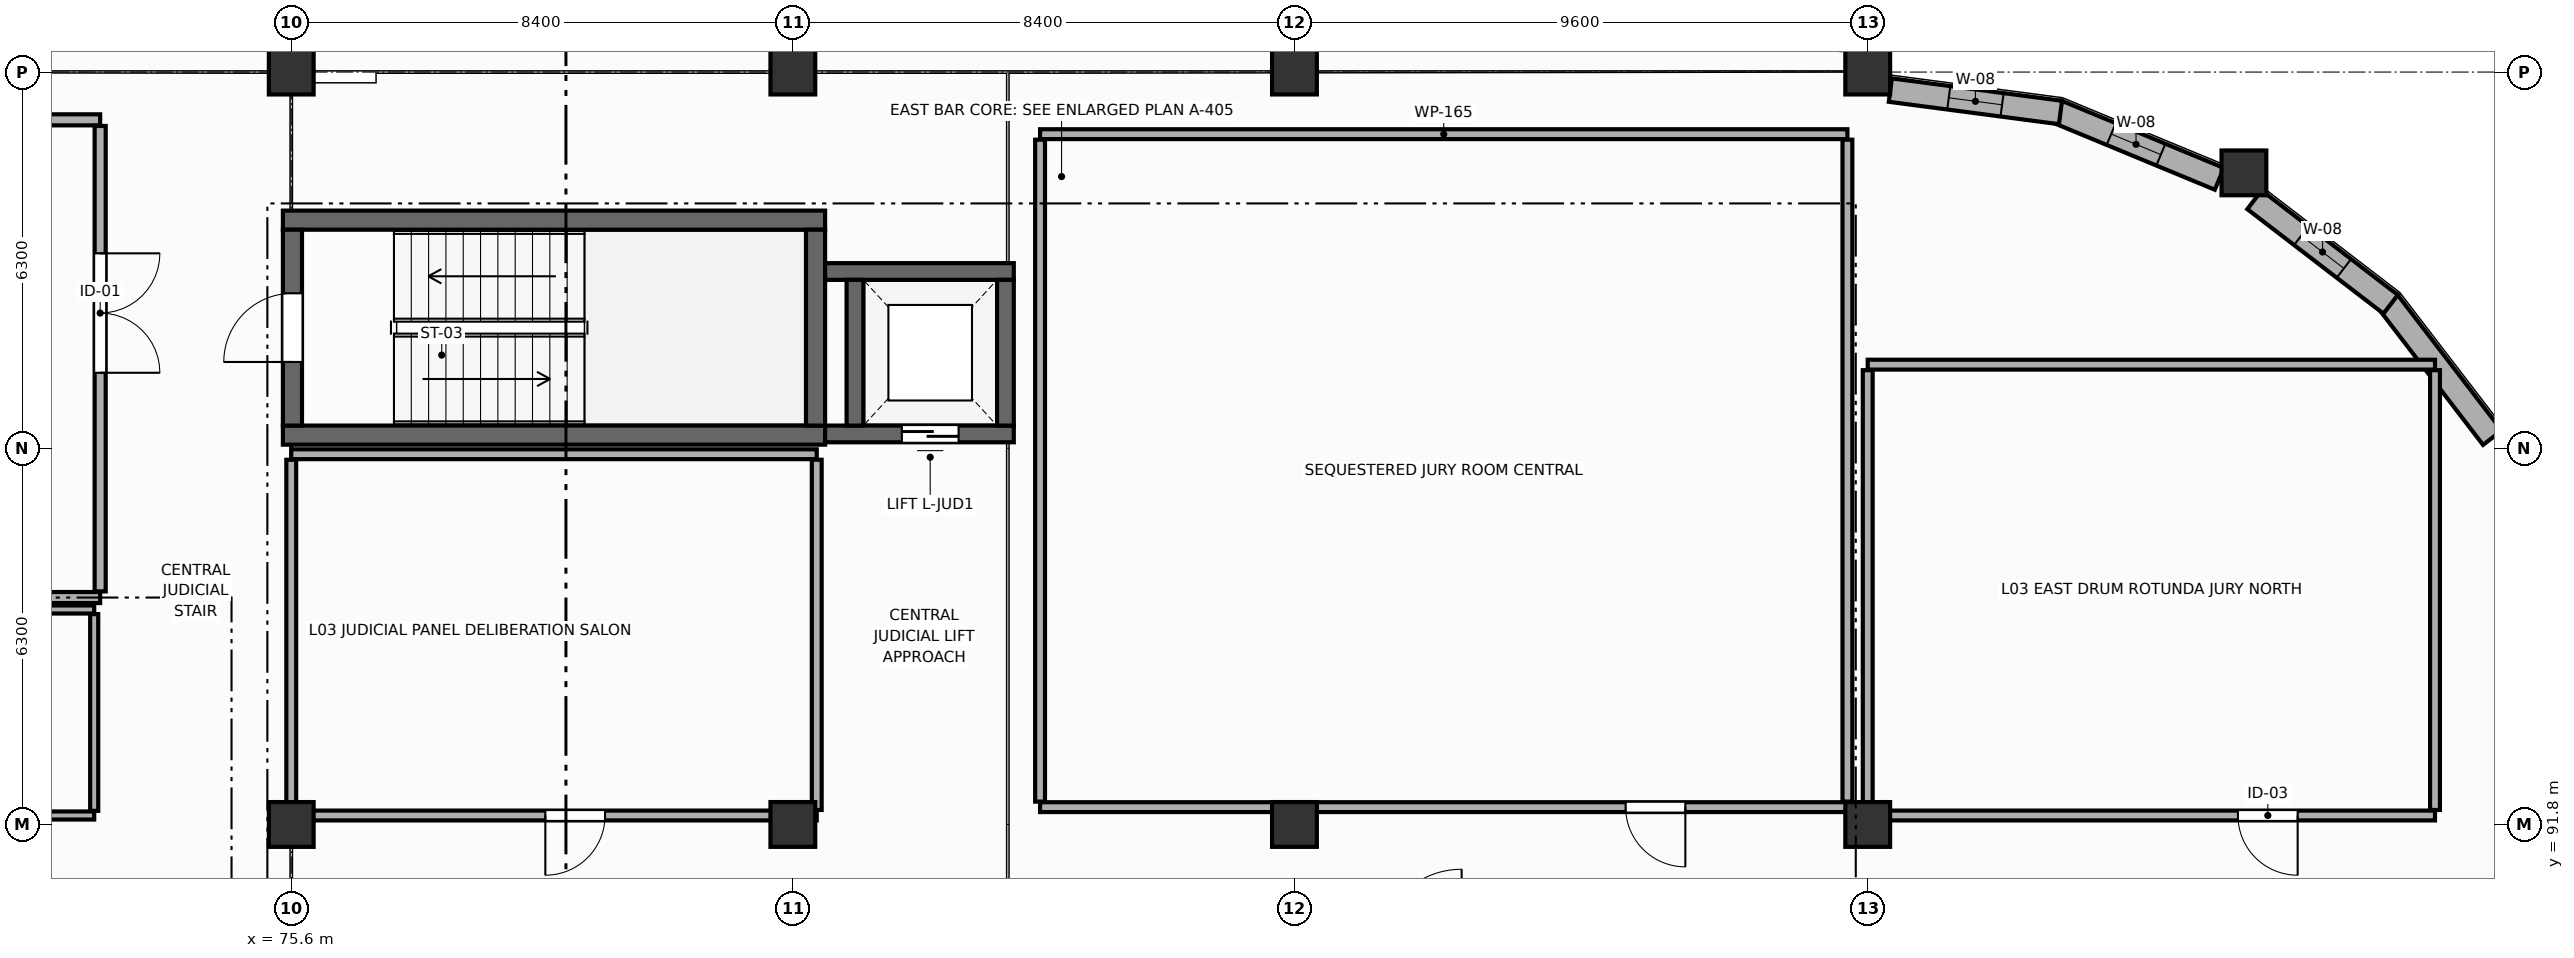
"""IFC4 building model, lengths in metres.
Left out: names, types, materials, properties, quantities, classifications, styles, units other than length and angle.
Written with IfcOpenShell. Run it as: python <this file> out.ifc"""

import sys

from ifc_helpers import new_model, si_unit, direction, frame, frame_2d, origin, origin_2d, place, context, subcontext, project, spatial, rectangle, circle, extrude, element, fill, save


model = new_model("IFC4")
c1 = context("Model", 3, precision=1e-05, world=origin(), true_north=direction((0.0, 1.0)))
c2 = subcontext(c1, "Body", "Model", "MODEL_VIEW")
j1 = project(units=[si_unit("LENGTHUNIT", "METRE"), si_unit("PLANEANGLEUNIT", "RADIAN")], contexts=[c1])
p1 = place(None, origin())
s1 = spatial("IfcSite", under=j1, at=p1, CompositionType="ELEMENT")
p2 = place(p1, origin())
s2 = spatial("IfcBuilding", under=s1, at=p2, CompositionType="ELEMENT")
p3 = place(p2, frame((0.0, 0.0, 9.9)))
s3 = spatial("IfcBuildingStorey", under=s2, at=p3, CompositionType="ELEMENT", Elevation=9.9)
for number, where, z_axis, x_axis in (
    (1, (75.6, 91.8, 0.0), (0.0, 0.0, 1.0), (1.0, 0.0, 0.0)),
    (2, (75.6, 104.4, 0.0), (0.0, 0.0, 1.0), (1.0, 0.0, 0.0)),
    (3, (84.0, 91.8, 0.0), (0.0, 0.0, 1.0), (1.0, 0.0, 0.0)),
    (4, (84.0, 104.4, 0.0), (0.0, 0.0, 1.0), (1.0, 0.0, 0.0)),
    (5, (92.4, 91.8, 0.0), (0.0, 0.0, 1.0), (1.0, 0.0, 0.0)),
    (6, (92.4, 104.4, 0.0), (0.0, 0.0, 1.0), (1.0, 0.0, 0.0)),
    (7, (102.0, 91.8, 0.0), (0.0, 0.0, 1.0), (1.0, 0.0, 0.0)),
    (8, (102.0, 104.4, 0.0), (0.0, 0.0, 1.0), (1.0, 0.0, 0.0)),
):
    element("IfcColumn", number, at=place(p3, frame(where, z_axis=z_axis, x_axis=x_axis)), inside=s3, PredefinedType="COLUMN", context=c2, shape_type="SweptSolid", body=[
        extrude(rectangle(XDim=0.75, YDim=0.75, at=origin_2d()), origin(), (0.0, 0.0, 1.0), 4.5),
    ])
p4 = place(p3, frame((108.3, 102.712, 0.0), z_axis=(0.0, 0.0, 1.0), x_axis=(1.0, 0.0, 0.0)))
e9 = element("IfcColumn", 9, at=p4, inside=s3, PredefinedType="COLUMN", context=c2, shape_type="SweptSolid", body=[
    extrude(circle(Radius=0.375, at=origin_2d()), origin(), (0.0, 0.0, 1.0), 4.5),
])
p5 = place(p3, frame((112.461, 98.277, 0.0), z_axis=(0.0, 0.0, 1.0), x_axis=(-0.608770300127, 0.793346533164, 0.0)))
e10 = element("IfcWall", 10, at=p5, inside=s3, PredefinedType="ELEMENTEDWALL", context=c2, shape_type="SweptSolid", body=[
    extrude(rectangle(XDim=2.874, YDim=0.395, at=frame_2d((1.437, 0.0))), origin(), (0.0, 0.0, 1.0), 3.38),
])
p6 = place(p3, frame((110.757, 100.511, 0.0), z_axis=(0.0, 0.0, 1.0), x_axis=(-0.793346533164, 0.608770300127, 0.0)))
e11 = element("IfcWall", 11, at=p6, inside=s3, PredefinedType="ELEMENTEDWALL", context=c2, shape_type="SweptSolid", body=[
    extrude(rectangle(XDim=2.874, YDim=0.395, at=frame_2d((1.437, 0.0))), origin(), (0.0, 0.0, 1.0), 3.28),
])
p7 = place(p6, frame((0.987, 0.0, 0.85)))
e12 = element("IfcOpeningElement", 12, at=p7, cuts=e11, PredefinedType="OPENING", context=c2, shape_type="SweptSolid", body=[
    extrude(rectangle(XDim=0.9, YDim=1.85, at=frame_2d((0.45, 0.925))), frame((0.0, 0.208, 0.0), z_axis=(0.0, -1.0, 0.0), x_axis=(1.0, 0.0, 0.0)), (0.0, 0.0, 1.0), 0.415),
])
p8 = place(p3, frame((107.888, 102.612, 0.0), z_axis=(0.0, 0.0, 1.0), x_axis=(-0.923871445027, 0.382702956696, 0.0)))
e13 = element("IfcWall", 13, at=p8, inside=s3, PredefinedType="ELEMENTEDWALL", context=c2, shape_type="SweptSolid", body=[
    extrude(rectangle(XDim=2.947, YDim=0.395, at=frame_2d((1.474, 0.0))), origin(), (0.0, 0.0, 1.0), 3.28),
])
p9 = place(p8, frame((1.06, 0.0, 0.85)))
e14 = element("IfcOpeningElement", 14, at=p9, cuts=e13, PredefinedType="OPENING", context=c2, shape_type="SweptSolid", body=[
    extrude(rectangle(XDim=0.9, YDim=1.85, at=frame_2d((0.45, 0.925))), frame((0.0, 0.208, 0.0), z_axis=(0.0, -1.0, 0.0), x_axis=(1.0, 0.0, 0.0)), (0.0, 0.0, 1.0), 0.415),
])
p10 = place(p3, frame((105.229, 103.723, 0.0), z_axis=(0.0, 0.0, 1.0), x_axis=(-0.991451982445, 0.130472090904, 0.0)))
e15 = element("IfcWall", 15, at=p10, inside=s3, PredefinedType="ELEMENTEDWALL", context=c2, shape_type="SweptSolid", body=[
    extrude(rectangle(XDim=2.874, YDim=0.395, at=frame_2d((1.437, 0.0))), origin(), (0.0, 0.0, 1.0), 3.38),
])
p11 = place(p10, frame((0.987, 0.0, 0.85)))
e16 = element("IfcOpeningElement", 16, at=p11, cuts=e15, PredefinedType="OPENING", context=c2, shape_type="SweptSolid", body=[
    extrude(rectangle(XDim=0.9, YDim=1.85, at=frame_2d((0.45, 0.925))), frame((0.0, 0.208, 0.0), z_axis=(0.0, -1.0, 0.0), x_axis=(1.0, 0.0, 0.0)), (0.0, 0.0, 1.0), 0.415),
])
for number, where, z_axis, x_axis in (
    (17, (75.46, 101.92, 0.0), (0.0, 0.0, 1.0), (1.0, 0.0, 0.0)),
    (18, (84.54, 98.32, 0.0), (0.0, 0.0, 1.0), (-1.0, 0.0, 0.0)),
):
    element("IfcWall", number, at=place(p3, frame(where, z_axis=z_axis, x_axis=x_axis)), inside=s3, PredefinedType="SHEAR", context=c2, shape_type="SweptSolid", body=[
        extrude(rectangle(XDim=9.08, YDim=0.32, at=frame_2d((4.54, 0.0))), origin(), (0.0, 0.0, 1.0), 4.25),
    ])
p12 = place(p3, frame((75.62, 98.48, 0.0), z_axis=(0.0, 0.0, 1.0), x_axis=(0.0, 1.0, 0.0)))
e19 = element("IfcWall", 19, at=p12, inside=s3, PredefinedType="SHEAR", context=c2, shape_type="SweptSolid", body=[
    extrude(rectangle(XDim=3.28, YDim=0.32, at=frame_2d((1.64, 0.0))), origin(), (0.0, 0.0, 1.0), 4.25),
])
p13 = place(p12, frame((1.065, 0.0, 0.0)))
e20 = element("IfcOpeningElement", 20, at=p13, cuts=e19, PredefinedType="OPENING", context=c2, shape_type="SweptSolid", body=[
    extrude(rectangle(XDim=1.15, YDim=2.2, at=frame_2d((0.575, 1.1))), frame((0.0, 0.17, 0.0), z_axis=(0.0, -1.0, 0.0), x_axis=(1.0, 0.0, 0.0)), (0.0, 0.0, 1.0), 0.34),
])
p14 = place(p3, frame((84.38, 101.76, 0.0), z_axis=(0.0, 0.0, 1.0), x_axis=(0.0, -1.0, 0.0)))
e21 = element("IfcWall", 21, at=p14, inside=s3, PredefinedType="SHEAR", context=c2, shape_type="SweptSolid", body=[
    extrude(rectangle(XDim=3.28, YDim=0.32, at=frame_2d((1.64, 0.0))), origin(), (0.0, 0.0, 1.0), 4.25),
])
p15 = place(p3, frame((84.54, 101.06, 0.0), z_axis=(0.0, 0.0, 1.0), x_axis=(1.0, 0.0, 0.0)))
e22 = element("IfcWall", 22, at=p15, inside=s3, PredefinedType="SHEAR", context=c2, shape_type="SweptSolid", body=[
    extrude(rectangle(XDim=3.16, YDim=0.28, at=frame_2d((1.58, 0.0))), origin(), (0.0, 0.0, 1.0), 4.25),
])
p16 = place(p3, frame((87.7, 98.34, 0.0), z_axis=(0.0, 0.0, 1.0), x_axis=(-1.0, 0.0, 0.0)))
e23 = element("IfcWall", 23, at=p16, inside=s3, PredefinedType="SHEAR", context=c2, shape_type="SweptSolid", body=[
    extrude(rectangle(XDim=3.16, YDim=0.28, at=frame_2d((1.58, 0.0))), origin(), (0.0, 0.0, 1.0), 4.25),
])
p17 = place(p16, frame((0.925, 0.0, 0.0)))
e24 = element("IfcOpeningElement", 24, at=p17, cuts=e23, PredefinedType="OPENING", context=c2, shape_type="SweptSolid", body=[
    extrude(rectangle(XDim=0.95, YDim=2.15, at=frame_2d((0.475, 1.075))), frame((0.0, 0.15, 0.0), z_axis=(0.0, -1.0, 0.0), x_axis=(1.0, 0.0, 0.0)), (0.0, 0.0, 1.0), 0.3),
])
for number, where, z_axis, x_axis in (
    (25, (85.04, 98.48, 0.0), (0.0, 0.0, 1.0), (0.0, 1.0, 0.0)),
    (26, (87.56, 100.92, 0.0), (0.0, 0.0, 1.0), (0.0, -1.0, 0.0)),
):
    element("IfcWall", number, at=place(p3, frame(where, z_axis=z_axis, x_axis=x_axis)), inside=s3, PredefinedType="SHEAR", context=c2, shape_type="SweptSolid", body=[
        extrude(rectangle(XDim=2.44, YDim=0.28, at=frame_2d((1.22, 0.0))), origin(), (0.0, 0.0, 1.0), 4.25),
    ])
for number, where, z_axis, x_axis in (
    (27, (59.0, 103.6, 0.0), (0.0, 0.0, 1.0), (1.0, 0.0, 0.0)),
    (28, (72.4, 95.6, 0.0), (0.0, 0.0, 1.0), (-1.0, 0.0, 0.0)),
):
    element("IfcWall", number, at=place(p3, frame(where, z_axis=z_axis, x_axis=x_axis)), inside=s3, PredefinedType="PARTITIONING", context=c2, shape_type="SweptSolid", body=[
        extrude(rectangle(XDim=13.4, YDim=0.185, at=frame_2d((6.7, 0.0))), origin(), (0.0, 0.0, 1.0), 3.38),
    ])
p18 = place(p3, frame((72.4, 103.498, 0.0), z_axis=(0.0, 0.0, 1.0), x_axis=(0.0, -1.0, 0.0)))
e29 = element("IfcWall", 29, at=p18, inside=s3, PredefinedType="PARTITIONING", context=c2, shape_type="SweptSolid", body=[
    extrude(rectangle(XDim=7.795, YDim=0.185, at=frame_2d((3.897, 0.0))), origin(), (0.0, 0.0, 1.0), 3.63),
])
p19 = place(p18, frame((2.133, 0.0, 0.0)))
e30 = element("IfcOpeningElement", 30, at=p19, cuts=e29, PredefinedType="OPENING", context=c2, shape_type="SweptSolid", body=[
    extrude(rectangle(XDim=2.0, YDim=2.5, at=frame_2d((1.0, 1.25))), frame((0.0, 0.103, 0.0), z_axis=(0.0, -1.0, 0.0), x_axis=(1.0, 0.0, 0.0)), (0.0, 0.0, 1.0), 0.205),
])
p20 = place(p3, frame((67.5, 95.4, 0.0), z_axis=(0.0, 0.0, 1.0), x_axis=(1.0, 0.0, 0.0)))
e31 = element("IfcWall", 31, at=p20, inside=s3, PredefinedType="PARTITIONING", context=c2, shape_type="SweptSolid", body=[
    extrude(rectangle(XDim=4.8, YDim=0.135, at=frame_2d((2.4, 0.0))), origin(), (0.0, 0.0, 1.0), 3.38),
])
p21 = place(p3, frame((72.3, 91.95, 0.0), z_axis=(0.0, 0.0, 1.0), x_axis=(-1.0, 0.0, 0.0)))
e32 = element("IfcWall", 32, at=p21, inside=s3, PredefinedType="PARTITIONING", context=c2, shape_type="SweptSolid", body=[
    extrude(rectangle(XDim=4.8, YDim=0.135, at=frame_2d((2.4, 0.0))), origin(), (0.0, 0.0, 1.0), 3.38),
])
p22 = place(p21, frame((1.61, 0.0, 0.0)))
e33 = element("IfcOpeningElement", 33, at=p22, cuts=e32, PredefinedType="OPENING", context=c2, shape_type="SweptSolid", body=[
    extrude(rectangle(XDim=0.95, YDim=2.15, at=frame_2d((0.475, 1.075))), frame((0.0, 0.077, 0.0), z_axis=(0.0, -1.0, 0.0), x_axis=(1.0, 0.0, 0.0)), (0.0, 0.0, 1.0), 0.155),
])
p23 = place(p3, frame((72.3, 95.323, 0.0), z_axis=(0.0, 0.0, 1.0), x_axis=(0.0, -1.0, 0.0)))
e34 = element("IfcWall", 34, at=p23, inside=s3, PredefinedType="PARTITIONING", context=c2, shape_type="SweptSolid", body=[
    extrude(rectangle(XDim=3.295, YDim=0.135, at=frame_2d((1.647, 0.0))), origin(), (0.0, 0.0, 1.0), 3.68),
])
p24 = place(p3, frame((75.6, 98.0, 0.0), z_axis=(0.0, 0.0, 1.0), x_axis=(1.0, 0.0, 0.0)))
e35 = element("IfcWall", 35, at=p24, inside=s3, PredefinedType="PARTITIONING", context=c2, shape_type="SweptSolid", body=[
    extrude(rectangle(XDim=8.8, YDim=0.165, at=frame_2d((4.4, 0.0))), origin(), (0.0, 0.0, 1.0), 3.38),
])
p25 = place(p3, frame((84.4, 91.95, 0.0), z_axis=(0.0, 0.0, 1.0), x_axis=(-1.0, 0.0, 0.0)))
e36 = element("IfcWall", 36, at=p25, inside=s3, PredefinedType="PARTITIONING", context=c2, shape_type="SweptSolid", body=[
    extrude(rectangle(XDim=8.8, YDim=0.165, at=frame_2d((4.4, 0.0))), origin(), (0.0, 0.0, 1.0), 3.38),
])
p26 = place(p25, frame((3.545, 0.0, 0.0)))
e37 = element("IfcOpeningElement", 37, at=p26, cuts=e36, PredefinedType="OPENING", context=c2, shape_type="SweptSolid", body=[
    extrude(rectangle(XDim=1.0, YDim=2.15, at=frame_2d((0.5, 1.075))), frame((0.0, 0.093, 0.0), z_axis=(0.0, -1.0, 0.0), x_axis=(1.0, 0.0, 0.0)), (0.0, 0.0, 1.0), 0.185),
])
for number, where, z_axis, x_axis in (
    (38, (75.6, 92.042, 0.0), (0.0, 0.0, 1.0), (0.0, 1.0, 0.0)),
    (39, (84.4, 97.907, 0.0), (0.0, 0.0, 1.0), (0.0, -1.0, 0.0)),
):
    element("IfcWall", number, at=place(p3, frame(where, z_axis=z_axis, x_axis=x_axis)), inside=s3, PredefinedType="PARTITIONING", context=c2, shape_type="SweptSolid", body=[
        extrude(rectangle(XDim=5.865, YDim=0.165, at=frame_2d((2.933, 0.0))), origin(), (0.0, 0.0, 1.0), 3.38),
    ])
p27 = place(p3, frame((88.14, 103.36, 0.0), z_axis=(0.0, 0.0, 1.0), x_axis=(1.0, 0.0, 0.0)))
e40 = element("IfcWall", 40, at=p27, inside=s3, PredefinedType="PARTITIONING", context=c2, shape_type="SweptSolid", body=[
    extrude(rectangle(XDim=13.52, YDim=0.165, at=frame_2d((6.76, 0.0))), origin(), (0.0, 0.0, 1.0), 3.38),
])
p28 = place(p3, frame((101.66, 92.09, 0.0), z_axis=(0.0, 0.0, 1.0), x_axis=(-1.0, 0.0, 0.0)))
e41 = element("IfcWall", 41, at=p28, inside=s3, PredefinedType="PARTITIONING", context=c2, shape_type="SweptSolid", body=[
    extrude(rectangle(XDim=13.52, YDim=0.165, at=frame_2d((6.76, 0.0))), origin(), (0.0, 0.0, 1.0), 3.38),
])
p29 = place(p28, frame((2.714, 0.0, 0.0)))
e42 = element("IfcOpeningElement", 42, at=p29, cuts=e41, PredefinedType="OPENING", context=c2, shape_type="SweptSolid", body=[
    extrude(rectangle(XDim=1.0, YDim=2.15, at=frame_2d((0.5, 1.075))), frame((0.0, 0.093, 0.0), z_axis=(0.0, -1.0, 0.0), x_axis=(1.0, 0.0, 0.0)), (0.0, 0.0, 1.0), 0.185),
])
p30 = place(p3, frame((88.14, 92.183, 0.0), z_axis=(0.0, 0.0, 1.0), x_axis=(0.0, 1.0, 0.0)))
e43 = element("IfcWall", 43, at=p30, inside=s3, PredefinedType="PARTITIONING", context=c2, shape_type="SweptSolid", body=[
    extrude(rectangle(XDim=11.085, YDim=0.165, at=frame_2d((5.542, 0.0))), origin(), (0.0, 0.0, 1.0), 3.68),
])
p31 = place(p3, frame((101.66, 103.268, 0.0), z_axis=(0.0, 0.0, 1.0), x_axis=(0.0, -1.0, 0.0)))
e44 = element("IfcWall", 44, at=p31, inside=s3, PredefinedType="PARTITIONING", context=c2, shape_type="SweptSolid", body=[
    extrude(rectangle(XDim=11.085, YDim=0.165, at=frame_2d((5.542, 0.0))), origin(), (0.0, 0.0, 1.0), 3.38),
])
p32 = place(p3, frame((102.0, 99.5, 0.0), z_axis=(0.0, 0.0, 1.0), x_axis=(1.0, 0.0, 0.0)))
e45 = element("IfcWall", 45, at=p32, inside=s3, PredefinedType="PARTITIONING", context=c2, shape_type="SweptSolid", body=[
    extrude(rectangle(XDim=9.5, YDim=0.165, at=frame_2d((4.75, 0.0))), origin(), (0.0, 0.0, 1.0), 3.28),
])
p33 = place(p3, frame((111.5, 91.95, 0.0), z_axis=(0.0, 0.0, 1.0), x_axis=(-1.0, 0.0, 0.0)))
e46 = element("IfcWall", 46, at=p33, inside=s3, PredefinedType="PARTITIONING", context=c2, shape_type="SweptSolid", body=[
    extrude(rectangle(XDim=9.5, YDim=0.165, at=frame_2d((4.75, 0.0))), origin(), (0.0, 0.0, 1.0), 3.28),
])
p34 = place(p33, frame((2.3, 0.0, 0.0)))
e47 = element("IfcOpeningElement", 47, at=p34, cuts=e46, PredefinedType="OPENING", context=c2, shape_type="SweptSolid", body=[
    extrude(rectangle(XDim=1.0, YDim=2.15, at=frame_2d((0.5, 1.075))), frame((0.0, 0.093, 0.0), z_axis=(0.0, -1.0, 0.0), x_axis=(1.0, 0.0, 0.0)), (0.0, 0.0, 1.0), 0.185),
])
for number, where, z_axis, x_axis in (
    (48, (102.0, 92.042, 0.0), (0.0, 0.0, 1.0), (0.0, 1.0, 0.0)),
    (49, (111.5, 99.407, 0.0), (0.0, 0.0, 1.0), (0.0, -1.0, 0.0)),
):
    element("IfcWall", number, at=place(p3, frame(where, z_axis=z_axis, x_axis=x_axis)), inside=s3, PredefinedType="PARTITIONING", context=c2, shape_type="SweptSolid", body=[
        extrude(rectangle(XDim=7.365, YDim=0.165, at=frame_2d((3.683, 0.0))), origin(), (0.0, 0.0, 1.0), 3.38),
    ])
p35 = place(p7, origin())
e50 = element("IfcWindow", 50, at=p35, inside=s3, PartitioningType="SINGLE_PANEL", PredefinedType="WINDOW", context=c2, shape_type="SweptSolid", body=[
    extrude(rectangle(XDim=0.9, YDim=1.85, at=frame_2d((0.45, 0.925))), frame((0.0, 0.03, 0.0), z_axis=(0.0, -1.0, 0.0), x_axis=(1.0, 0.0, 0.0)), (0.0, 0.0, 1.0), 0.06),
])
fill(e12, e50)
p36 = place(p9, origin())
e51 = element("IfcWindow", 51, at=p36, inside=s3, PartitioningType="SINGLE_PANEL", PredefinedType="WINDOW", context=c2, shape_type="SweptSolid", body=[
    extrude(rectangle(XDim=0.9, YDim=1.85, at=frame_2d((0.45, 0.925))), frame((0.0, 0.03, 0.0), z_axis=(0.0, -1.0, 0.0), x_axis=(1.0, 0.0, 0.0)), (0.0, 0.0, 1.0), 0.06),
])
fill(e14, e51)
p37 = place(p11, origin())
e52 = element("IfcWindow", 52, at=p37, inside=s3, PartitioningType="SINGLE_PANEL", PredefinedType="WINDOW", context=c2, shape_type="SweptSolid", body=[
    extrude(rectangle(XDim=0.9, YDim=1.85, at=frame_2d((0.45, 0.925))), frame((0.0, 0.03, 0.0), z_axis=(0.0, -1.0, 0.0), x_axis=(1.0, 0.0, 0.0)), (0.0, 0.0, 1.0), 0.06),
])
fill(e16, e52)
p38 = place(p13, origin())
e53 = element("IfcDoor", 53, at=p38, inside=s3, OperationType="SINGLE_SWING_LEFT", PredefinedType="DOOR", context=c2, shape_type="SweptSolid", body=[
    extrude(rectangle(XDim=1.15, YDim=2.2, at=frame_2d((0.575, 1.1))), frame((0.0, 0.025, 0.0), z_axis=(0.0, -1.0, 0.0), x_axis=(1.0, 0.0, 0.0)), (0.0, 0.0, 1.0), 0.05),
])
fill(e20, e53)
p39 = place(p17, origin())
e54 = element("IfcDoor", 54, at=p39, inside=s3, OperationType="DOUBLE_DOOR_SLIDING", PredefinedType="DOOR", context=c2, shape_type="SweptSolid", body=[
    extrude(rectangle(XDim=0.95, YDim=2.15, at=frame_2d((0.475, 1.075))), frame((0.0, 0.025, 0.0), z_axis=(0.0, -1.0, 0.0), x_axis=(1.0, 0.0, 0.0)), (0.0, 0.0, 1.0), 0.05),
])
fill(e24, e54)
p40 = place(p19, origin())
e55 = element("IfcDoor", 55, at=p40, inside=s3, OperationType="DOUBLE_DOOR_SINGLE_SWING", PredefinedType="DOOR", context=c2, shape_type="SweptSolid", body=[
    extrude(rectangle(XDim=2.0, YDim=2.5, at=frame_2d((1.0, 1.25))), frame((0.0, 0.025, 0.0), z_axis=(0.0, -1.0, 0.0), x_axis=(1.0, 0.0, 0.0)), (0.0, 0.0, 1.0), 0.05),
])
fill(e30, e55)
p41 = place(p26, origin())
e56 = element("IfcDoor", 56, at=p41, inside=s3, OperationType="SINGLE_SWING_RIGHT", PredefinedType="DOOR", context=c2, shape_type="SweptSolid", body=[
    extrude(rectangle(XDim=1.0, YDim=2.15, at=frame_2d((0.5, 1.075))), frame((0.0, 0.025, 0.0), z_axis=(0.0, -1.0, 0.0), x_axis=(1.0, 0.0, 0.0)), (0.0, 0.0, 1.0), 0.05),
])
fill(e37, e56)
p42 = place(p29, origin())
e57 = element("IfcDoor", 57, at=p42, inside=s3, OperationType="SINGLE_SWING_LEFT", PredefinedType="DOOR", context=c2, shape_type="SweptSolid", body=[
    extrude(rectangle(XDim=1.0, YDim=2.15, at=frame_2d((0.5, 1.075))), frame((0.0, 0.025, 0.0), z_axis=(0.0, -1.0, 0.0), x_axis=(1.0, 0.0, 0.0)), (0.0, 0.0, 1.0), 0.05),
])
fill(e42, e57)
p43 = place(p34, origin())
e58 = element("IfcDoor", 58, at=p43, inside=s3, OperationType="SINGLE_SWING_LEFT", PredefinedType="DOOR", context=c2, shape_type="SweptSolid", body=[
    extrude(rectangle(XDim=1.0, YDim=2.15, at=frame_2d((0.5, 1.075))), frame((0.0, 0.025, 0.0), z_axis=(0.0, -1.0, 0.0), x_axis=(1.0, 0.0, 0.0)), (0.0, 0.0, 1.0), 0.05),
])
fill(e47, e58)
save(model, sys.argv[1])
